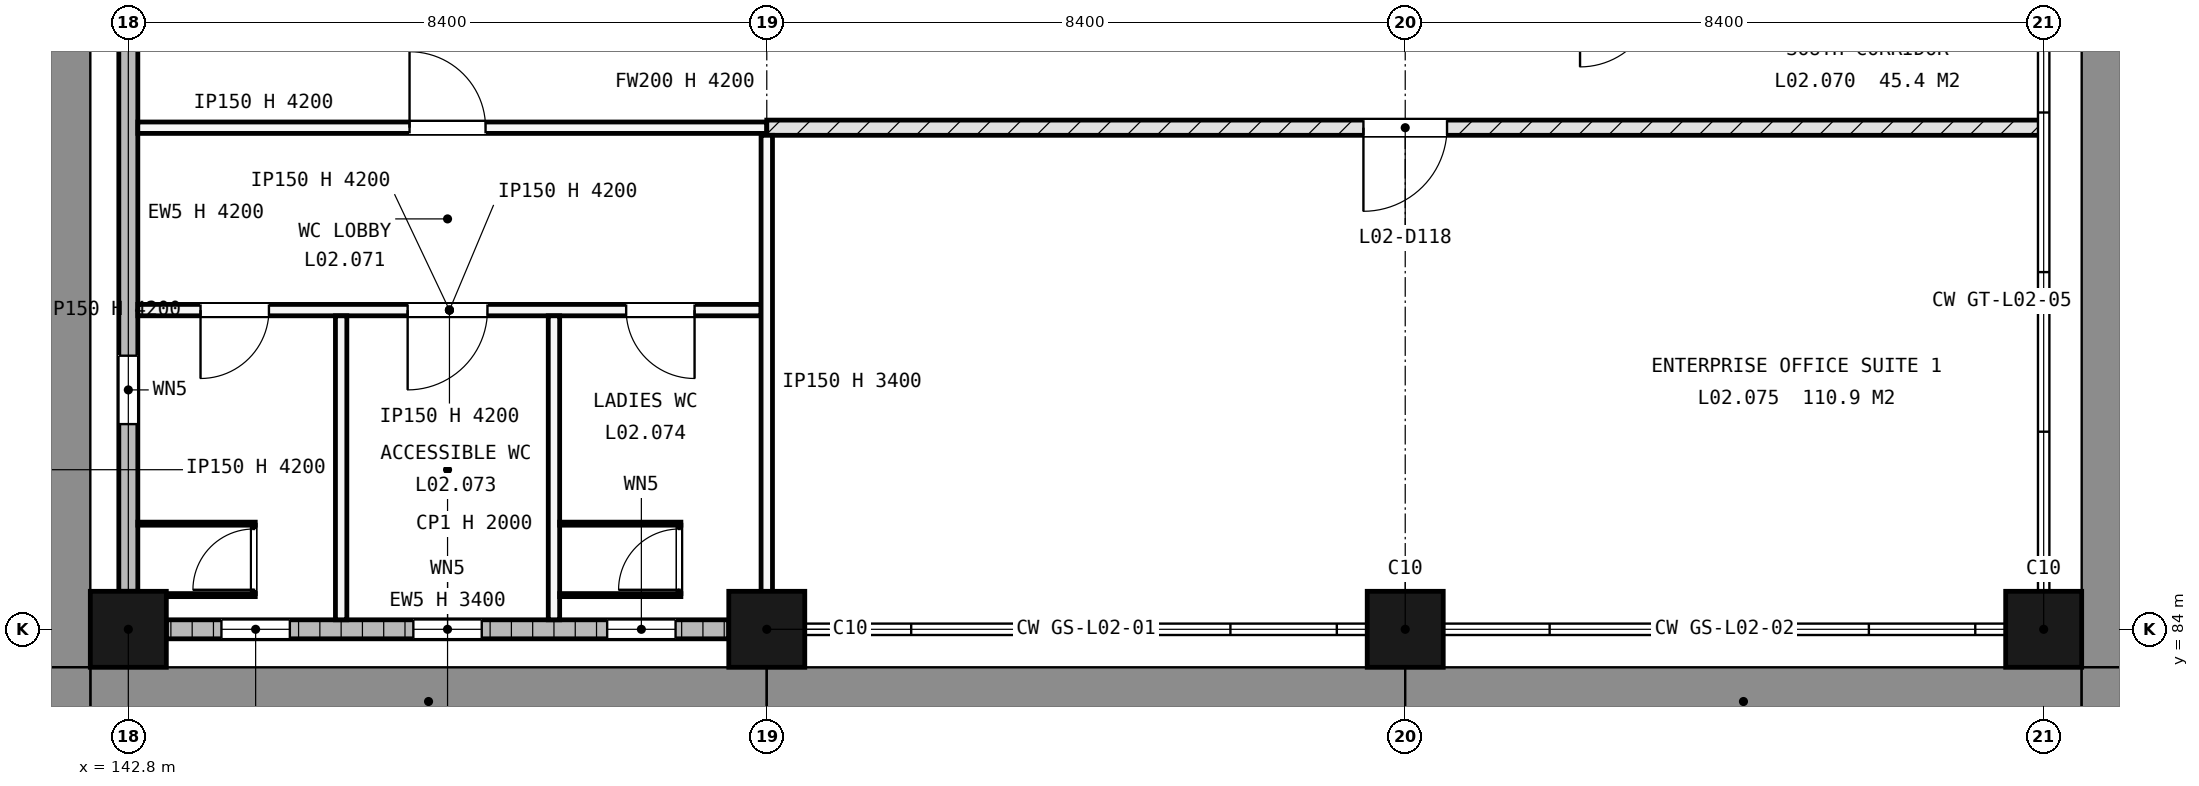
"""IFC4 building model, lengths in metres.
Left out: names, types, materials, properties, quantities, classifications, styles, units other than length and angle.
Written with IfcOpenShell. Run it as: python <this file> out.ifc"""

import sys

from ifc_helpers import new_model, si_unit, direction, frame, frame_2d, origin, origin_2d, place, context, subcontext, project, spatial, rectangle, extrude, element, fill, save


model = new_model("IFC4")
c1 = context("Model", 3, precision=1e-05, world=origin(), true_north=direction((0.0, 1.0)))
c2 = subcontext(c1, "Body", "Model", "MODEL_VIEW")
j1 = project(units=[si_unit("LENGTHUNIT", "METRE"), si_unit("PLANEANGLEUNIT", "RADIAN")], contexts=[c1])
p1 = place(None, origin())
s1 = spatial("IfcSite", under=j1, at=p1, CompositionType="ELEMENT")
p2 = place(p1, origin())
s2 = spatial("IfcBuilding", under=s1, at=p2, CompositionType="ELEMENT")
p3 = place(p2, frame((0.0, 0.0, 9.9)))
s3 = spatial("IfcBuildingStorey", under=s2, at=p3, CompositionType="ELEMENT", Elevation=9.9)
for number, where, z_axis, x_axis in (
    (1, (142.8, 84.0, -0.25), (0.0, 0.0, 1.0), (1.0, 0.0, 0.0)),
    (2, (151.2, 84.0, -0.25), (0.0, 0.0, 1.0), (1.0, 0.0, 0.0)),
    (3, (159.6, 84.0, -0.25), (0.0, 0.0, 1.0), (1.0, 0.0, 0.0)),
    (4, (168.0, 84.0, -0.25), (0.0, 0.0, 1.0), (1.0, 0.0, 0.0)),
):
    element("IfcColumn", number, at=place(p3, frame(where, z_axis=z_axis, x_axis=x_axis)), inside=s3, PredefinedType="COLUMN", context=c2, shape_type="SweptSolid", body=[
        extrude(rectangle(XDim=1.0, YDim=1.0, at=origin_2d()), origin(), (0.0, 0.0, 1.0), 4.45),
    ])
p4 = place(p3, frame((143.3, 84.0, 0.0), z_axis=(0.0, 0.0, 1.0), x_axis=(1.0, 0.0, 0.0)))
e5 = element("IfcWall", 5, at=p4, inside=s3, PredefinedType="STANDARD", context=c2, shape_type="SweptSolid", body=[
    extrude(rectangle(XDim=7.4, YDim=0.25, at=frame_2d((3.7, 0.0))), origin(), (0.0, 0.0, 1.0), 3.4),
])
p5 = place(p4, frame((0.725, 0.0, 2.1)))
e6 = element("IfcOpeningElement", 6, at=p5, cuts=e5, PredefinedType="OPENING", context=c2, shape_type="SweptSolid", body=[
    extrude(rectangle(XDim=0.9, YDim=0.6, at=frame_2d((0.45, 0.3))), frame((0.0, 0.135, 0.0), z_axis=(0.0, -1.0, 0.0), x_axis=(1.0, 0.0, 0.0)), (0.0, 0.0, 1.0), 0.27),
])
p6 = place(p4, frame((3.25, 0.0, 2.1)))
e7 = element("IfcOpeningElement", 7, at=p6, cuts=e5, PredefinedType="OPENING", context=c2, shape_type="SweptSolid", body=[
    extrude(rectangle(XDim=0.9, YDim=0.6, at=frame_2d((0.45, 0.3))), frame((0.0, 0.135, 0.0), z_axis=(0.0, -1.0, 0.0), x_axis=(1.0, 0.0, 0.0)), (0.0, 0.0, 1.0), 0.27),
])
p7 = place(p4, frame((5.8, 0.0, 2.1)))
e8 = element("IfcOpeningElement", 8, at=p7, cuts=e5, PredefinedType="OPENING", context=c2, shape_type="SweptSolid", body=[
    extrude(rectangle(XDim=0.9, YDim=0.6, at=frame_2d((0.45, 0.3))), frame((0.0, 0.135, 0.0), z_axis=(0.0, -1.0, 0.0), x_axis=(1.0, 0.0, 0.0)), (0.0, 0.0, 1.0), 0.27),
])
p8 = place(p3, frame((142.8, 84.5, 0.0), z_axis=(0.0, 0.0, 1.0), x_axis=(0.0, 1.0, 0.0)))
e9 = element("IfcWall", 9, at=p8, inside=s3, PredefinedType="STANDARD", context=c2, shape_type="SweptSolid", body=[
    extrude(rectangle(XDim=7.65, YDim=0.25, at=frame_2d((3.825, 0.0))), origin(), (0.0, 0.0, 1.0), 4.2),
])
p9 = place(p8, frame((2.2, 0.0, 2.1)))
e10 = element("IfcOpeningElement", 10, at=p9, cuts=e9, PredefinedType="OPENING", context=c2, shape_type="SweptSolid", body=[
    extrude(rectangle(XDim=0.9, YDim=0.6, at=frame_2d((0.45, 0.3))), frame((0.0, 0.135, 0.0), z_axis=(0.0, -1.0, 0.0), x_axis=(1.0, 0.0, 0.0)), (0.0, 0.0, 1.0), 0.27),
])
p10 = place(p3, frame((142.925, 88.2, 0.0), z_axis=(0.0, 0.0, 1.0), x_axis=(1.0, 0.0, 0.0)))
e11 = element("IfcWall", 11, at=p10, inside=s3, PredefinedType="PARTITIONING", context=c2, shape_type="SweptSolid", body=[
    extrude(rectangle(XDim=8.2, YDim=0.15, at=frame_2d((4.1, 0.0))), origin(), (0.0, 0.0, 1.0), 4.2),
])
p11 = place(p10, frame((0.825, 0.0, 0.0)))
e12 = element("IfcOpeningElement", 12, at=p11, cuts=e11, PredefinedType="OPENING", context=c2, shape_type="SweptSolid", body=[
    extrude(rectangle(XDim=0.9, YDim=2.1, at=frame_2d((0.45, 1.05))), frame((0.0, 0.085, 0.0), z_axis=(0.0, -1.0, 0.0), x_axis=(1.0, 0.0, 0.0)), (0.0, 0.0, 1.0), 0.17),
])
p12 = place(p10, frame((3.55, 0.0, 0.0)))
e13 = element("IfcOpeningElement", 13, at=p12, cuts=e11, PredefinedType="OPENING", context=c2, shape_type="SweptSolid", body=[
    extrude(rectangle(XDim=1.05, YDim=2.25, at=frame_2d((0.525, 1.125))), frame((0.0, 0.085, 0.0), z_axis=(0.0, -1.0, 0.0), x_axis=(1.0, 0.0, 0.0)), (0.0, 0.0, 1.0), 0.17),
])
p13 = place(p10, frame((6.425, 0.0, 0.0)))
e14 = element("IfcOpeningElement", 14, at=p13, cuts=e11, PredefinedType="OPENING", context=c2, shape_type="SweptSolid", body=[
    extrude(rectangle(XDim=0.9, YDim=2.1, at=frame_2d((0.45, 1.05))), frame((0.0, 0.085, 0.0), z_axis=(0.0, -1.0, 0.0), x_axis=(1.0, 0.0, 0.0)), (0.0, 0.0, 1.0), 0.17),
])
p14 = place(p3, frame((142.925, 90.6, 0.0), z_axis=(0.0, 0.0, 1.0), x_axis=(1.0, 0.0, 0.0)))
e15 = element("IfcWall", 15, at=p14, inside=s3, PredefinedType="PARTITIONING", context=c2, shape_type="SweptSolid", body=[
    extrude(rectangle(XDim=8.275, YDim=0.15, at=frame_2d((4.137, 0.0))), origin(), (0.0, 0.0, 1.0), 4.2),
])
p15 = place(p14, frame((3.575, 0.0, 0.0)))
e16 = element("IfcOpeningElement", 16, at=p15, cuts=e15, PredefinedType="OPENING", context=c2, shape_type="SweptSolid", body=[
    extrude(rectangle(XDim=1.0, YDim=2.1, at=frame_2d((0.5, 1.05))), frame((0.0, 0.085, 0.0), z_axis=(0.0, -1.0, 0.0), x_axis=(1.0, 0.0, 0.0)), (0.0, 0.0, 1.0), 0.17),
])
p16 = place(p3, frame((151.2, 90.6, 0.0), z_axis=(0.0, 0.0, 1.0), x_axis=(1.0, 0.0, 0.0)))
e17 = element("IfcWall", 17, at=p16, inside=s3, PredefinedType="SOLIDWALL", context=c2, shape_type="SweptSolid", body=[
    extrude(rectangle(XDim=16.8, YDim=0.2, at=frame_2d((8.4, 0.0))), origin(), (0.0, 0.0, 1.0), 4.2),
])
p17 = place(p16, frame((7.85, 0.0, 0.0)))
e18 = element("IfcOpeningElement", 18, at=p17, cuts=e17, PredefinedType="OPENING", context=c2, shape_type="SweptSolid", body=[
    extrude(rectangle(XDim=1.1, YDim=2.25, at=frame_2d((0.55, 1.125))), frame((0.0, 0.11, 0.0), z_axis=(0.0, -1.0, 0.0), x_axis=(1.0, 0.0, 0.0)), (0.0, 0.0, 1.0), 0.22),
])
for number, where, z_axis, x_axis in (
    (19, (145.6, 84.125, 0.0), (0.0, 0.0, 1.0), (0.0, 1.0, 0.0)),
    (20, (148.4, 84.125, 0.0), (0.0, 0.0, 1.0), (0.0, 1.0, 0.0)),
):
    element("IfcWall", number, at=place(p3, frame(where, z_axis=z_axis, x_axis=x_axis)), inside=s3, PredefinedType="PARTITIONING", context=c2, shape_type="SweptSolid", body=[
        extrude(rectangle(XDim=4.0, YDim=0.15, at=frame_2d((2.0, 0.0))), origin(), (0.0, 0.0, 1.0), 4.2),
    ])
p18 = place(p3, frame((151.2, 84.0, 0.0), z_axis=(0.0, 0.0, 1.0), x_axis=(0.0, 1.0, 0.0)))
e21 = element("IfcWall", 21, at=p18, inside=s3, PredefinedType="PARTITIONING", context=c2, shape_type="SweptSolid", body=[
    extrude(rectangle(XDim=6.5, YDim=0.15, at=frame_2d((3.25, 0.0))), origin(), (0.0, 0.0, 1.0), 3.4),
])
p19 = place(p3, frame((142.93, 84.45, 0.0), z_axis=(0.0, 0.0, 1.0), x_axis=(1.0, 0.0, 0.0)))
e22 = element("IfcWall", 22, at=p19, inside=s3, PredefinedType="PARTITIONING", context=c2, shape_type="SweptSolid", body=[
    extrude(rectangle(XDim=1.54, YDim=0.04, at=frame_2d((0.77, 0.0))), origin(), (0.0, 0.0, 1.0), 2.0),
])
p20 = place(p3, frame((142.925, 85.39, 0.0), z_axis=(0.0, 0.0, 1.0), x_axis=(1.0, 0.0, 0.0)))
e23 = element("IfcWall", 23, at=p20, inside=s3, PredefinedType="PARTITIONING", context=c2, shape_type="SweptSolid", body=[
    extrude(rectangle(XDim=1.545, YDim=0.04, at=frame_2d((0.772, 0.0))), origin(), (0.0, 0.0, 1.0), 2.0),
])
p21 = place(p3, frame((144.45, 84.47, 0.0), z_axis=(0.0, 0.0, 1.0), x_axis=(0.0, 1.0, 0.0)))
e24 = element("IfcWall", 24, at=p21, inside=s3, PredefinedType="PARTITIONING", context=c2, shape_type="SweptSolid", body=[
    extrude(rectangle(XDim=0.9, YDim=0.04, at=frame_2d((0.45, 0.0))), origin(), (0.0, 0.0, 1.0), 2.0),
])
p22 = place(p21, frame((0.05, 0.0, 0.0)))
e25 = element("IfcOpeningElement", 25, at=p22, cuts=e24, PredefinedType="OPENING", context=c2, shape_type="SweptSolid", body=[
    extrude(rectangle(XDim=0.8, YDim=2.0, at=frame_2d((0.4, 1.0))), frame((0.0, 0.03, 0.0), z_axis=(0.0, -1.0, 0.0), x_axis=(1.0, 0.0, 0.0)), (0.0, 0.0, 1.0), 0.06),
])
for number, where, z_axis, x_axis in (
    (26, (148.475, 84.45, 0.0), (0.0, 0.0, 1.0), (1.0, 0.0, 0.0)),
    (27, (148.475, 85.39, 0.0), (0.0, 0.0, 1.0), (1.0, 0.0, 0.0)),
):
    element("IfcWall", number, at=place(p3, frame(where, z_axis=z_axis, x_axis=x_axis)), inside=s3, PredefinedType="PARTITIONING", context=c2, shape_type="SweptSolid", body=[
        extrude(rectangle(XDim=1.595, YDim=0.04, at=frame_2d((0.797, 0.0))), origin(), (0.0, 0.0, 1.0), 2.0),
    ])
p23 = place(p3, frame((150.05, 84.47, 0.0), z_axis=(0.0, 0.0, 1.0), x_axis=(0.0, 1.0, 0.0)))
e28 = element("IfcWall", 28, at=p23, inside=s3, PredefinedType="PARTITIONING", context=c2, shape_type="SweptSolid", body=[
    extrude(rectangle(XDim=0.9, YDim=0.04, at=frame_2d((0.45, 0.0))), origin(), (0.0, 0.0, 1.0), 2.0),
])
p24 = place(p23, frame((0.05, 0.0, 0.0)))
e29 = element("IfcOpeningElement", 29, at=p24, cuts=e28, PredefinedType="OPENING", context=c2, shape_type="SweptSolid", body=[
    extrude(rectangle(XDim=0.8, YDim=2.0, at=frame_2d((0.4, 1.0))), frame((0.0, 0.03, 0.0), z_axis=(0.0, -1.0, 0.0), x_axis=(1.0, 0.0, 0.0)), (0.0, 0.0, 1.0), 0.06),
])
p25 = place(p5, origin())
e30 = element("IfcWindow", 30, at=p25, inside=s3, PartitioningType="SINGLE_PANEL", PredefinedType="WINDOW", context=c2, shape_type="SweptSolid", body=[
    extrude(rectangle(XDim=0.9, YDim=0.6, at=frame_2d((0.45, 0.3))), frame((0.0, 0.03, 0.0), z_axis=(0.0, -1.0, 0.0), x_axis=(1.0, 0.0, 0.0)), (0.0, 0.0, 1.0), 0.06),
])
fill(e6, e30)
p26 = place(p6, origin())
e31 = element("IfcWindow", 31, at=p26, inside=s3, PartitioningType="SINGLE_PANEL", PredefinedType="WINDOW", context=c2, shape_type="SweptSolid", body=[
    extrude(rectangle(XDim=0.9, YDim=0.6, at=frame_2d((0.45, 0.3))), frame((0.0, 0.03, 0.0), z_axis=(0.0, -1.0, 0.0), x_axis=(1.0, 0.0, 0.0)), (0.0, 0.0, 1.0), 0.06),
])
fill(e7, e31)
p27 = place(p7, origin())
e32 = element("IfcWindow", 32, at=p27, inside=s3, PartitioningType="SINGLE_PANEL", PredefinedType="WINDOW", context=c2, shape_type="SweptSolid", body=[
    extrude(rectangle(XDim=0.9, YDim=0.6, at=frame_2d((0.45, 0.3))), frame((0.0, 0.03, 0.0), z_axis=(0.0, -1.0, 0.0), x_axis=(1.0, 0.0, 0.0)), (0.0, 0.0, 1.0), 0.06),
])
fill(e8, e32)
p28 = place(p9, origin())
e33 = element("IfcWindow", 33, at=p28, inside=s3, PartitioningType="SINGLE_PANEL", PredefinedType="WINDOW", context=c2, shape_type="SweptSolid", body=[
    extrude(rectangle(XDim=0.9, YDim=0.6, at=frame_2d((0.45, 0.3))), frame((0.0, 0.03, 0.0), z_axis=(0.0, -1.0, 0.0), x_axis=(1.0, 0.0, 0.0)), (0.0, 0.0, 1.0), 0.06),
])
fill(e10, e33)
p29 = place(p11, origin())
e34 = element("IfcDoor", 34, at=p29, inside=s3, OperationType="SINGLE_SWING_LEFT", PredefinedType="DOOR", context=c2, shape_type="SweptSolid", body=[
    extrude(rectangle(XDim=0.9, YDim=2.1, at=frame_2d((0.45, 1.05))), frame((0.0, 0.025, 0.0), z_axis=(0.0, -1.0, 0.0), x_axis=(1.0, 0.0, 0.0)), (0.0, 0.0, 1.0), 0.05),
])
fill(e12, e34)
p30 = place(p12, origin())
e35 = element("IfcDoor", 35, at=p30, inside=s3, OperationType="SINGLE_SWING_LEFT", PredefinedType="DOOR", context=c2, shape_type="SweptSolid", body=[
    extrude(rectangle(XDim=1.05, YDim=2.25, at=frame_2d((0.525, 1.125))), frame((0.0, 0.025, 0.0), z_axis=(0.0, -1.0, 0.0), x_axis=(1.0, 0.0, 0.0)), (0.0, 0.0, 1.0), 0.05),
])
fill(e13, e35)
p31 = place(p13, origin())
e36 = element("IfcDoor", 36, at=p31, inside=s3, OperationType="SINGLE_SWING_RIGHT", PredefinedType="DOOR", context=c2, shape_type="SweptSolid", body=[
    extrude(rectangle(XDim=0.9, YDim=2.1, at=frame_2d((0.45, 1.05))), frame((0.0, 0.025, 0.0), z_axis=(0.0, -1.0, 0.0), x_axis=(1.0, 0.0, 0.0)), (0.0, 0.0, 1.0), 0.05),
])
fill(e14, e36)
p32 = place(p17, origin())
e37 = element("IfcDoor", 37, at=p32, inside=s3, OperationType="SINGLE_SWING_LEFT", PredefinedType="DOOR", context=c2, shape_type="SweptSolid", body=[
    extrude(rectangle(XDim=1.1, YDim=2.25, at=frame_2d((0.55, 1.125))), frame((0.0, 0.025, 0.0), z_axis=(0.0, -1.0, 0.0), x_axis=(1.0, 0.0, 0.0)), (0.0, 0.0, 1.0), 0.05),
])
fill(e18, e37)
p33 = place(p15, origin())
e38 = element("IfcDoor", 38, at=p33, inside=s3, OperationType="SINGLE_SWING_RIGHT", PredefinedType="DOOR", context=c2, shape_type="SweptSolid", body=[
    extrude(rectangle(XDim=1.0, YDim=2.1, at=frame_2d((0.5, 1.05))), frame((0.0, 0.025, 0.0), z_axis=(0.0, -1.0, 0.0), x_axis=(1.0, 0.0, 0.0)), (0.0, 0.0, 1.0), 0.05),
])
fill(e16, e38)
p34 = place(p22, origin())
e39 = element("IfcDoor", 39, at=p34, inside=s3, OperationType="SINGLE_SWING_LEFT", PredefinedType="DOOR", context=c2, shape_type="SweptSolid", body=[
    extrude(rectangle(XDim=0.8, YDim=2.0, at=frame_2d((0.4, 1.0))), frame((0.0, 0.02, 0.0), z_axis=(0.0, -1.0, 0.0), x_axis=(1.0, 0.0, 0.0)), (0.0, 0.0, 1.0), 0.04),
])
fill(e25, e39)
p35 = place(p24, origin())
e40 = element("IfcDoor", 40, at=p35, inside=s3, OperationType="SINGLE_SWING_LEFT", PredefinedType="DOOR", context=c2, shape_type="SweptSolid", body=[
    extrude(rectangle(XDim=0.8, YDim=2.0, at=frame_2d((0.4, 1.0))), frame((0.0, 0.02, 0.0), z_axis=(0.0, -1.0, 0.0), x_axis=(1.0, 0.0, 0.0)), (0.0, 0.0, 1.0), 0.04),
])
fill(e29, e40)
save(model, sys.argv[1])
